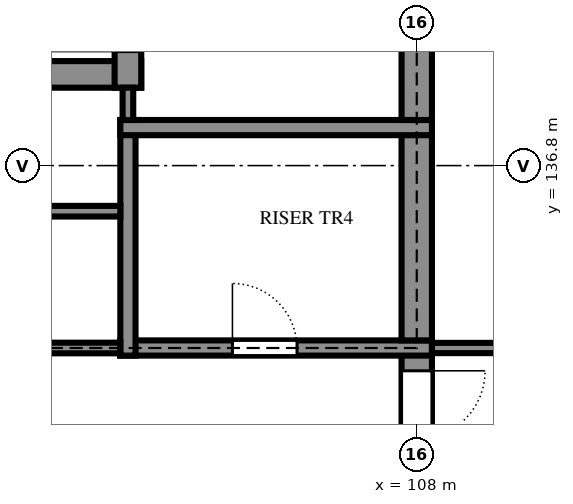
"""IFC4 building model, lengths in metres.
Left out: names, types, materials, properties, quantities, classifications, styles, units other than length and angle.
Written with IfcOpenShell. Run it as: python <this file> out.ifc"""

import sys

from ifc_helpers import new_model, si_unit, direction, frame, frame_2d, origin, place, context, subcontext, project, spatial, rectangle, extrude, element, fill, save


model = new_model("IFC4")
c1 = context("Model", 3, precision=1e-05, world=origin(), true_north=direction((0.0, 1.0)))
c2 = subcontext(c1, "Body", "Model", "MODEL_VIEW")
j1 = project(units=[si_unit("LENGTHUNIT", "METRE"), si_unit("PLANEANGLEUNIT", "RADIAN")], contexts=[c1])
p1 = place(None, origin())
s1 = spatial("IfcSite", under=j1, at=p1, CompositionType="ELEMENT")
p2 = place(p1, origin())
s2 = spatial("IfcBuilding", under=s1, at=p2, CompositionType="ELEMENT")
p3 = place(p2, frame((0.0, 0.0, 10.8)))
s3 = spatial("IfcBuildingStorey", under=s2, at=p3, CompositionType="ELEMENT", Elevation=10.8)
p4 = place(p3, frame((108.0, 132.0, 0.0), z_axis=(0.0, 0.0, 1.0), x_axis=(0.0, 1.0, 0.0)))
e1 = element("IfcWall", 1, at=p4, inside=s3, PredefinedType="SHEAR", context=c2, shape_type="SweptSolid", body=[
    extrude(rectangle(XDim=2.5, YDim=0.4, at=frame_2d((1.25, 0.0))), origin(), (0.0, 0.0, 1.0), 3.6),
])
p5 = place(p4, frame((0.3, 0.0, 0.0)))
e2 = element("IfcOpeningElement", 2, at=p5, cuts=e1, PredefinedType="OPENING", context=c2, shape_type="SweptSolid", body=[
    extrude(rectangle(XDim=1.8, YDim=2.1, at=frame_2d((0.9, 1.05))), frame((0.0, 0.21, 0.0), z_axis=(0.0, -1.0, 0.0), x_axis=(1.0, 0.0, 0.0)), (0.0, 0.0, 1.0), 0.42),
])
p6 = place(p3, frame((104.1, 134.4, 0.0), z_axis=(0.0, 0.0, 1.0), x_axis=(1.0, 0.0, 0.0)))
e3 = element("IfcWall", 3, at=p6, inside=s3, PredefinedType="SHEAR", context=c2, shape_type="SweptSolid", body=[
    extrude(rectangle(XDim=4.1, YDim=0.2, at=frame_2d((2.05, 0.0))), origin(), (0.0, 0.0, 1.0), 3.6),
])
p7 = place(p6, frame((1.475, 0.0, 0.0)))
e4 = element("IfcOpeningElement", 4, at=p7, cuts=e3, PredefinedType="OPENING", context=c2, shape_type="SweptSolid", body=[
    extrude(rectangle(XDim=0.85, YDim=2.1, at=frame_2d((0.425, 1.05))), frame((0.0, 0.11, 0.0), z_axis=(0.0, -1.0, 0.0), x_axis=(1.0, 0.0, 0.0)), (0.0, 0.0, 1.0), 0.22),
])
p8 = place(p3, frame((108.0, 134.5, 0.0), z_axis=(0.0, 0.0, 1.0), x_axis=(0.0, 1.0, 0.0)))
e5 = element("IfcWall", 5, at=p8, inside=s3, PredefinedType="SHEAR", context=c2, shape_type="SweptSolid", body=[
    extrude(rectangle(XDim=2.9, YDim=0.4, at=frame_2d((1.45, 0.0))), origin(), (0.0, 0.0, 1.0), 3.6),
])
p9 = place(p3, frame((104.2, 137.4, 0.0), z_axis=(0.0, 0.0, 1.0), x_axis=(0.0, -1.0, 0.0)))
e6 = element("IfcWall", 6, at=p9, inside=s3, PredefinedType="SHEAR", context=c2, shape_type="SweptSolid", body=[
    extrude(rectangle(XDim=3.1, YDim=0.2, at=frame_2d((1.55, 0.0))), origin(), (0.0, 0.0, 1.0), 3.6),
])
p10 = place(p3, frame((108.2, 137.3, 0.0), z_axis=(0.0, 0.0, 1.0), x_axis=(-1.0, 0.0, 0.0)))
e7 = element("IfcWall", 7, at=p10, inside=s3, PredefinedType="SHEAR", context=c2, shape_type="SweptSolid", body=[
    extrude(rectangle(XDim=4.1, YDim=0.2, at=frame_2d((2.05, 0.0))), origin(), (0.0, 0.0, 1.0), 3.6),
])
p11 = place(p3, frame((108.0, 137.4, 0.0), z_axis=(0.0, 0.0, 1.0), x_axis=(0.0, 1.0, 0.0)))
e8 = element("IfcWall", 8, at=p11, inside=s3, PredefinedType="SHEAR", context=c2, shape_type="SweptSolid", body=[
    extrude(rectangle(XDim=6.6, YDim=0.4, at=frame_2d((3.3, 0.0))), origin(), (0.0, 0.0, 1.0), 3.6),
])
p12 = place(p3, frame((100.625, 138.0, 0.0), z_axis=(0.0, 0.0, 1.0), x_axis=(1.0, 0.0, 0.0)))
e9 = element("IfcWall", 9, at=p12, inside=s3, PredefinedType="SHEAR", context=c2, shape_type="SweptSolid", body=[
    extrude(rectangle(XDim=3.75, YDim=0.35, at=frame_2d((1.875, 0.0))), origin(), (0.0, 0.0, 1.0), 3.6),
])
p13 = place(p12, frame((1.375, 0.0, 0.0)))
e10 = element("IfcOpeningElement", 10, at=p13, cuts=e9, PredefinedType="OPENING", context=c2, shape_type="SweptSolid", body=[
    extrude(rectangle(XDim=1.0, YDim=2.1, at=frame_2d((0.5, 1.05))), frame((0.0, 0.185, 0.0), z_axis=(0.0, -1.0, 0.0), x_axis=(1.0, 0.0, 0.0)), (0.0, 0.0, 1.0), 0.37),
])
p14 = place(p3, frame((104.2, 137.825, 0.0), z_axis=(0.0, 0.0, 1.0), x_axis=(0.0, 1.0, 0.0)))
e11 = element("IfcWall", 11, at=p14, inside=s3, PredefinedType="SHEAR", context=c2, shape_type="SweptSolid", body=[
    extrude(rectangle(XDim=3.475, YDim=0.35, at=frame_2d((1.738, 0.0))), origin(), (0.0, 0.0, 1.0), 3.6),
])
p15 = place(p14, frame((0.475, 0.0, 0.0)))
e12 = element("IfcOpeningElement", 12, at=p15, cuts=e11, PredefinedType="OPENING", context=c2, shape_type="SweptSolid", body=[
    extrude(rectangle(XDim=1.0, YDim=2.1, at=frame_2d((0.5, 1.05))), frame((0.0, 0.185, 0.0), z_axis=(0.0, -1.0, 0.0), x_axis=(1.0, 0.0, 0.0)), (0.0, 0.0, 1.0), 0.37),
])
p16 = place(p3, frame((100.8, 134.4, 0.0), z_axis=(0.0, 0.0, 1.0), x_axis=(1.0, 0.0, 0.0)))
e13 = element("IfcWall", 13, at=p16, inside=s3, PredefinedType="PARTITIONING", context=c2, shape_type="SweptSolid", body=[
    extrude(rectangle(XDim=3.3, YDim=0.14, at=frame_2d((1.65, 0.0))), origin(), (0.0, 0.0, 1.0), 3.42),
])
p17 = place(p16, frame((1.2, 0.0, 0.0)))
e14 = element("IfcOpeningElement", 14, at=p17, cuts=e13, PredefinedType="OPENING", context=c2, shape_type="SweptSolid", body=[
    extrude(rectangle(XDim=1.0, YDim=2.1, at=frame_2d((0.5, 1.05))), frame((0.0, 0.08, 0.0), z_axis=(0.0, -1.0, 0.0), x_axis=(1.0, 0.0, 0.0)), (0.0, 0.0, 1.0), 0.16),
])
p18 = place(p3, frame((108.2, 134.4, 0.0), z_axis=(0.0, 0.0, 1.0), x_axis=(1.0, 0.0, 0.0)))
e15 = element("IfcWall", 15, at=p18, inside=s3, PredefinedType="PARTITIONING", context=c2, shape_type="SweptSolid", body=[
    extrude(rectangle(XDim=25.07, YDim=0.135, at=frame_2d((12.535, 0.0))), origin(), (0.0, 0.0, 1.0), 3.159),
])
p19 = place(p18, frame((4.6, 0.0, 0.0)))
e16 = element("IfcOpeningElement", 16, at=p19, cuts=e15, PredefinedType="OPENING", context=c2, shape_type="SweptSolid", body=[
    extrude(rectangle(XDim=1.8, YDim=2.1, at=frame_2d((0.9, 1.05))), frame((0.0, 0.077, 0.0), z_axis=(0.0, -1.0, 0.0), x_axis=(1.0, 0.0, 0.0)), (0.0, 0.0, 1.0), 0.155),
])
p20 = place(p18, frame((17.8, 0.0, 0.0)))
e17 = element("IfcOpeningElement", 17, at=p20, cuts=e15, PredefinedType="OPENING", context=c2, shape_type="SweptSolid", body=[
    extrude(rectangle(XDim=1.8, YDim=2.1, at=frame_2d((0.9, 1.05))), frame((0.0, 0.077, 0.0), z_axis=(0.0, -1.0, 0.0), x_axis=(1.0, 0.0, 0.0)), (0.0, 0.0, 1.0), 0.155),
])
p21 = place(p3, frame((100.8, 136.2, 0.0), z_axis=(0.0, 0.0, 1.0), x_axis=(1.0, 0.0, 0.0)))
e18 = element("IfcWall", 18, at=p21, inside=s3, PredefinedType="PARTITIONING", context=c2, shape_type="SweptSolid", body=[
    extrude(rectangle(XDim=3.3, YDim=0.14, at=frame_2d((1.65, 0.0))), origin(), (0.0, 0.0, 1.0), 3.42),
])
p22 = place(p21, frame((1.2, 0.0, 0.0)))
e19 = element("IfcOpeningElement", 19, at=p22, cuts=e18, PredefinedType="OPENING", context=c2, shape_type="SweptSolid", body=[
    extrude(rectangle(XDim=1.0, YDim=2.1, at=frame_2d((0.5, 1.05))), frame((0.0, 0.08, 0.0), z_axis=(0.0, -1.0, 0.0), x_axis=(1.0, 0.0, 0.0)), (0.0, 0.0, 1.0), 0.16),
])
p23 = place(p3, frame((104.2, 137.4, 0.0), z_axis=(0.0, 0.0, 1.0), x_axis=(0.0, 1.0, 0.0)))
e20 = element("IfcWall", 20, at=p23, inside=s3, PredefinedType="PARTITIONING", context=c2, shape_type="SweptSolid", body=[
    extrude(rectangle(XDim=0.425, YDim=0.14, at=frame_2d((0.212, 0.0))), origin(), (0.0, 0.0, 1.0), 3.42),
])
p24 = place(p7, origin())
e21 = element("IfcDoor", 21, at=p24, inside=s3, OperationType="SINGLE_SWING_RIGHT", PredefinedType="DOOR", context=c2, shape_type="SweptSolid", body=[
    extrude(rectangle(XDim=0.85, YDim=2.1, at=frame_2d((0.425, 1.05))), frame((0.0, 0.025, 0.0), z_axis=(0.0, -1.0, 0.0), x_axis=(1.0, 0.0, 0.0)), (0.0, 0.0, 1.0), 0.05),
])
fill(e4, e21)
p25 = place(p5, frame((1.8, 0.0, 0.0), z_axis=(0.0, 0.0, 1.0), x_axis=(-1.0, 0.0, 0.0)))
e22 = element("IfcDoor", 22, at=p25, inside=s3, OperationType="DOUBLE_DOOR_SINGLE_SWING", PredefinedType="DOOR", context=c2, shape_type="SweptSolid", body=[
    extrude(rectangle(XDim=1.8, YDim=2.1, at=frame_2d((0.9, 1.05))), frame((0.0, 0.025, 0.0), z_axis=(0.0, -1.0, 0.0), x_axis=(1.0, 0.0, 0.0)), (0.0, 0.0, 1.0), 0.05),
])
fill(e2, e22)
save(model, sys.argv[1])
